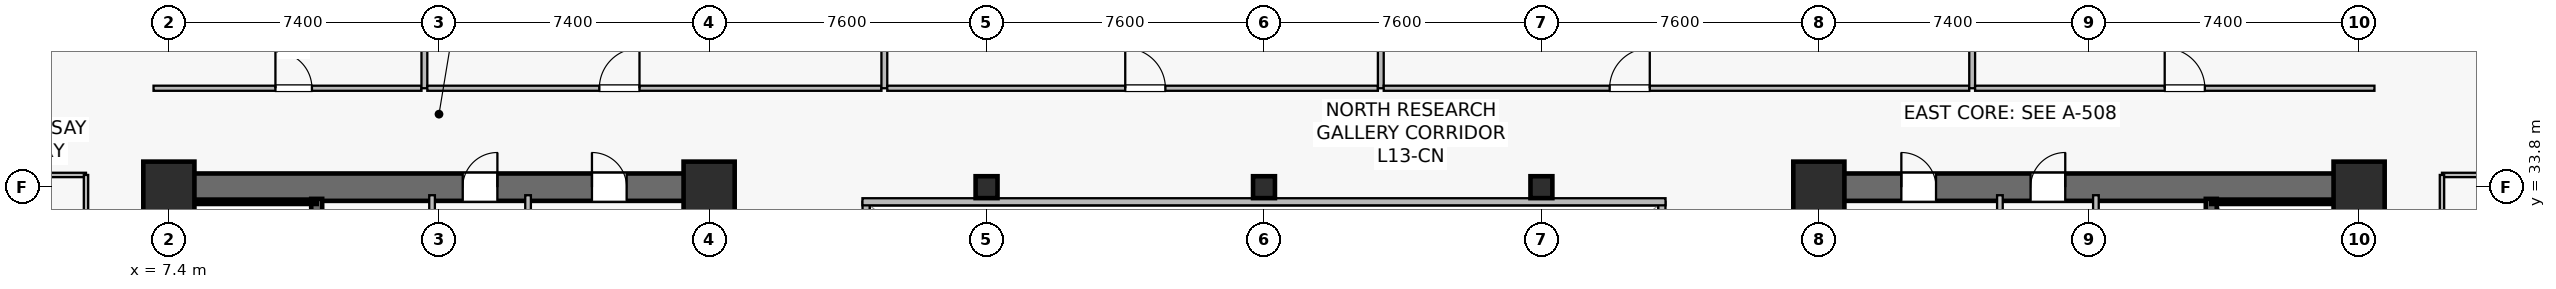
"""IFC4 building model, lengths in metres.
Left out: names, types, materials, properties, quantities, classifications, styles, units other than length and angle.
Written with IfcOpenShell. Run it as: python <this file> out.ifc"""

import sys

from ifc_helpers import new_model, si_unit, direction, frame, frame_2d, origin, origin_2d, place, context, subcontext, project, spatial, rectangle, hollow_rectangle, extrude, source, transform, mapped, element, fill, save


model = new_model("IFC4")
c1 = context("Model", 3, precision=1e-05, world=origin(), true_north=direction((0.0, 1.0)))
c2 = subcontext(c1, "Body", "Model", "MODEL_VIEW")
j1 = project(units=[si_unit("LENGTHUNIT", "METRE"), si_unit("PLANEANGLEUNIT", "RADIAN")], contexts=[c1])
p1 = place(None, origin())
s1 = spatial("IfcSite", under=j1, at=p1, CompositionType="ELEMENT")
p2 = place(p1, origin())
s2 = spatial("IfcBuilding", under=s1, at=p2, CompositionType="ELEMENT")
p3 = place(p2, frame((0.0, 0.0, 53.9)))
s3 = spatial("IfcBuildingStorey", under=s2, at=p3, CompositionType="ELEMENT", Elevation=53.9)
p4 = place(p3, frame((7.025, 33.8, 0.0), z_axis=(0.0, 0.0, 1.0), x_axis=(1.0, 0.0, 0.0)))
e1 = element("IfcWall", 1, at=p4, inside=s3, PredefinedType="SHEAR", context=c2, shape_type="SweptSolid", body=[
    extrude(rectangle(XDim=15.55, YDim=0.75, at=frame_2d((7.775, 0.0))), origin(), (0.0, 0.0, 1.0), 3.78),
])
p5 = place(p4, frame((8.425, 0.0, 0.0)))
e2 = element("IfcOpeningElement", 2, at=p5, cuts=e1, PredefinedType="OPENING", context=c2, shape_type="SweptSolid", body=[
    extrude(rectangle(XDim=0.95, YDim=2.15, at=frame_2d((0.475, 1.075))), frame((0.0, 0.385, 0.0), z_axis=(0.0, -1.0, 0.0), x_axis=(1.0, 0.0, 0.0)), (0.0, 0.0, 1.0), 0.77),
])
p6 = place(p4, frame((11.965, 0.0, 0.0)))
e3 = element("IfcOpeningElement", 3, at=p6, cuts=e1, PredefinedType="OPENING", context=c2, shape_type="SweptSolid", body=[
    extrude(rectangle(XDim=0.95, YDim=2.15, at=frame_2d((0.475, 1.075))), frame((0.0, 0.385, 0.0), z_axis=(0.0, -1.0, 0.0), x_axis=(1.0, 0.0, 0.0)), (0.0, 0.0, 1.0), 0.77),
])
p7 = place(p3, frame((7.4, 15.175, 0.0), z_axis=(0.0, 0.0, 1.0), x_axis=(0.0, 1.0, 0.0)))
e4 = element("IfcWall", 4, at=p7, inside=s3, PredefinedType="SHEAR", context=c2, shape_type="SweptSolid", body=[
    extrude(rectangle(XDim=18.25, YDim=0.75, at=frame_2d((9.125, 0.0))), origin(), (0.0, 0.0, 1.0), 3.78),
])
p8 = place(p3, frame((22.2, 15.175, 0.0), z_axis=(0.0, 0.0, 1.0), x_axis=(0.0, 1.0, 0.0)))
e5 = element("IfcWall", 5, at=p8, inside=s3, PredefinedType="SHEAR", context=c2, shape_type="SweptSolid", body=[
    extrude(rectangle(XDim=18.25, YDim=0.75, at=frame_2d((9.125, 0.0))), origin(), (0.0, 0.0, 1.0), 3.78),
])
p9 = place(p8, frame((3.375, 0.0, 0.0)))
e6 = element("IfcOpeningElement", 6, at=p9, cuts=e5, PredefinedType="OPENING", context=c2, shape_type="SweptSolid", body=[
    extrude(rectangle(XDim=1.42, YDim=2.2, at=frame_2d((0.71, 1.1))), frame((0.0, 0.385, 0.0), z_axis=(0.0, -1.0, 0.0), x_axis=(1.0, 0.0, 0.0)), (0.0, 0.0, 1.0), 0.77),
])
p10 = place(p3, frame((11.45, 24.85, 0.0), z_axis=(0.0, 0.0, 1.0), x_axis=(0.0, 1.0, 0.0)))
e7 = element("IfcWall", 7, at=p10, inside=s3, PredefinedType="SHEAR", context=c2, shape_type="SweptSolid", body=[
    extrude(rectangle(XDim=8.63, YDim=0.3, at=frame_2d((4.315, 0.0))), origin(), (0.0, 0.0, 1.0), 3.78),
])
p11 = place(p10, frame((0.42, 0.0, 0.0)))
e8 = element("IfcOpeningElement", 8, at=p11, cuts=e7, PredefinedType="OPENING", context=c2, shape_type="SweptSolid", body=[
    extrude(rectangle(XDim=1.1, YDim=2.15, at=frame_2d((0.55, 1.075))), frame((0.0, 0.16, 0.0), z_axis=(0.0, -1.0, 0.0), x_axis=(1.0, 0.0, 0.0)), (0.0, 0.0, 1.0), 0.32),
])
p12 = place(p3, frame((7.73, 33.4, 0.0), z_axis=(0.0, 0.0, 1.0), x_axis=(1.0, 0.0, 0.0)))
e9 = element("IfcWall", 9, at=p12, inside=s3, PredefinedType="SOLIDWALL", context=c2, shape_type="SweptSolid", body=[
    extrude(rectangle(XDim=3.72, YDim=0.12, at=frame_2d((1.86, 0.0))), origin(), (0.0, 0.0, 1.0), 3.78),
])
p13 = place(p3, frame((52.225, 33.8, 0.0), z_axis=(0.0, 0.0, 1.0), x_axis=(1.0, 0.0, 0.0)))
e10 = element("IfcWall", 10, at=p13, inside=s3, PredefinedType="SHEAR", context=c2, shape_type="SweptSolid", body=[
    extrude(rectangle(XDim=15.55, YDim=0.75, at=frame_2d((7.775, 0.0))), origin(), (0.0, 0.0, 1.0), 3.78),
])
p14 = place(p13, frame((6.175, 0.0, 0.0)))
e11 = element("IfcOpeningElement", 11, at=p14, cuts=e10, PredefinedType="OPENING", context=c2, shape_type="SweptSolid", body=[
    extrude(rectangle(XDim=0.95, YDim=2.15, at=frame_2d((0.475, 1.075))), frame((0.0, 0.385, 0.0), z_axis=(0.0, -1.0, 0.0), x_axis=(1.0, 0.0, 0.0)), (0.0, 0.0, 1.0), 0.77),
])
p15 = place(p13, frame((2.635, 0.0, 0.0)))
e12 = element("IfcOpeningElement", 12, at=p15, cuts=e10, PredefinedType="OPENING", context=c2, shape_type="SweptSolid", body=[
    extrude(rectangle(XDim=0.95, YDim=2.15, at=frame_2d((0.475, 1.075))), frame((0.0, 0.385, 0.0), z_axis=(0.0, -1.0, 0.0), x_axis=(1.0, 0.0, 0.0)), (0.0, 0.0, 1.0), 0.77),
])
p16 = place(p3, frame((52.6, 15.175, 0.0), z_axis=(0.0, 0.0, 1.0), x_axis=(0.0, 1.0, 0.0)))
e13 = element("IfcWall", 13, at=p16, inside=s3, PredefinedType="SHEAR", context=c2, shape_type="SweptSolid", body=[
    extrude(rectangle(XDim=18.25, YDim=0.75, at=frame_2d((9.125, 0.0))), origin(), (0.0, 0.0, 1.0), 3.78),
])
p17 = place(p16, frame((3.375, 0.0, 0.0)))
e14 = element("IfcOpeningElement", 14, at=p17, cuts=e13, PredefinedType="OPENING", context=c2, shape_type="SweptSolid", body=[
    extrude(rectangle(XDim=1.42, YDim=2.2, at=frame_2d((0.71, 1.1))), frame((0.0, 0.385, 0.0), z_axis=(0.0, -1.0, 0.0), x_axis=(1.0, 0.0, 0.0)), (0.0, 0.0, 1.0), 0.77),
])
p18 = place(p3, frame((67.4, 15.175, 0.0), z_axis=(0.0, 0.0, 1.0), x_axis=(0.0, 1.0, 0.0)))
e15 = element("IfcWall", 15, at=p18, inside=s3, PredefinedType="SHEAR", context=c2, shape_type="SweptSolid", body=[
    extrude(rectangle(XDim=18.25, YDim=0.75, at=frame_2d((9.125, 0.0))), origin(), (0.0, 0.0, 1.0), 3.78),
])
p19 = place(p3, frame((63.35, 24.85, 0.0), z_axis=(0.0, 0.0, 1.0), x_axis=(0.0, 1.0, 0.0)))
e16 = element("IfcWall", 16, at=p19, inside=s3, PredefinedType="SHEAR", context=c2, shape_type="SweptSolid", body=[
    extrude(rectangle(XDim=8.63, YDim=0.3, at=frame_2d((4.315, 0.0))), origin(), (0.0, 0.0, 1.0), 3.78),
])
p20 = place(p19, frame((0.42, 0.0, 0.0)))
e17 = element("IfcOpeningElement", 17, at=p20, cuts=e16, PredefinedType="OPENING", context=c2, shape_type="SweptSolid", body=[
    extrude(rectangle(XDim=1.1, YDim=2.15, at=frame_2d((0.55, 1.075))), frame((0.0, 0.16, 0.0), z_axis=(0.0, -1.0, 0.0), x_axis=(1.0, 0.0, 0.0)), (0.0, 0.0, 1.0), 0.32),
])
p21 = place(p3, frame((63.35, 33.4, 0.0), z_axis=(0.0, 0.0, 1.0), x_axis=(1.0, 0.0, 0.0)))
e18 = element("IfcWall", 18, at=p21, inside=s3, PredefinedType="SOLIDWALL", context=c2, shape_type="SweptSolid", body=[
    extrude(rectangle(XDim=3.72, YDim=0.12, at=frame_2d((1.86, 0.0))), origin(), (0.0, 0.0, 1.0), 3.78),
])
m1 = source(origin(), c2, "Body", "SweptSolid", [
    extrude(rectangle(XDim=1.4, YDim=1.4, at=origin_2d()), origin(), (0.0, 0.0, 1.0), 4.1),
])
for number, where, z_axis, x_axis in (
    (19, (7.4, 33.8, 0.0), (0.0, 0.0, 1.0), (1.0, 0.0, 0.0)),
    (20, (22.2, 33.8, 0.0), (0.0, 0.0, 1.0), (1.0, 0.0, 0.0)),
    (21, (52.6, 33.8, 0.0), (0.0, 0.0, 1.0), (1.0, 0.0, 0.0)),
    (22, (67.4, 33.8, 0.0), (0.0, 0.0, 1.0), (1.0, 0.0, 0.0)),
):
    element("IfcColumn", number, at=place(p3, frame(where, z_axis=z_axis, x_axis=x_axis)), inside=s3, PredefinedType="COLUMN", context=c2, shape_type="MappedRepresentation", body=[
        mapped(m1, transform((0.0, 0.0, 0.0), scale=1.0)),
    ])
m2 = source(origin(), c2, "Body", "SweptSolid", [
    extrude(hollow_rectangle(XDim=0.6, YDim=0.6, WallThickness=0.028, at=origin_2d()), origin(), (0.0, 0.0, 1.0), 4.1),
])
for number, where, z_axis, x_axis in (
    (23, (29.8, 33.8, 0.0), (0.0, 0.0, 1.0), (1.0, 0.0, 0.0)),
    (24, (37.4, 33.8, 0.0), (0.0, 0.0, 1.0), (1.0, 0.0, 0.0)),
    (25, (45.0, 33.8, 0.0), (0.0, 0.0, 1.0), (1.0, 0.0, 0.0)),
):
    element("IfcColumn", number, at=place(p3, frame(where, z_axis=z_axis, x_axis=x_axis)), inside=s3, PredefinedType="COLUMN", context=c2, shape_type="MappedRepresentation", body=[
        mapped(m2, transform((0.0, 0.0, 0.0), scale=1.0)),
    ])
p22 = place(p3, frame((14.61, 29.65, 0.0), z_axis=(0.0, 0.0, 1.0), x_axis=(0.0, 1.0, 0.0)))
e26 = element("IfcWall", 26, at=p22, inside=s3, PredefinedType="PLUMBINGWALL", context=c2, shape_type="SweptSolid", body=[
    extrude(rectangle(XDim=3.93, YDim=0.155, at=frame_2d((1.965, 0.0))), origin(), (0.0, 0.0, 1.0), 3.065),
])
p23 = place(p3, frame((17.24, 29.65, 0.0), z_axis=(0.0, 0.0, 1.0), x_axis=(0.0, 1.0, 0.0)))
e27 = element("IfcWall", 27, at=p23, inside=s3, PredefinedType="PLUMBINGWALL", context=c2, shape_type="SweptSolid", body=[
    extrude(rectangle(XDim=3.93, YDim=0.155, at=frame_2d((1.965, 0.0))), origin(), (0.0, 0.0, 1.0), 3.78),
])
p24 = place(p3, frame((60.19, 29.65, 0.0), z_axis=(0.0, 0.0, 1.0), x_axis=(0.0, 1.0, 0.0)))
e28 = element("IfcWall", 28, at=p24, inside=s3, PredefinedType="PLUMBINGWALL", context=c2, shape_type="SweptSolid", body=[
    extrude(rectangle(XDim=3.93, YDim=0.155, at=frame_2d((1.965, 0.0))), origin(), (0.0, 0.0, 1.0), 3.065),
])
p25 = place(p3, frame((57.56, 29.65, 0.0), z_axis=(0.0, 0.0, 1.0), x_axis=(0.0, 1.0, 0.0)))
e29 = element("IfcWall", 29, at=p25, inside=s3, PredefinedType="PLUMBINGWALL", context=c2, shape_type="SweptSolid", body=[
    extrude(rectangle(XDim=3.93, YDim=0.155, at=frame_2d((1.965, 0.0))), origin(), (0.0, 0.0, 1.0), 3.78),
])
p26 = place(p3, frame((26.5, 15.2, 0.0), z_axis=(0.0, 0.0, 1.0), x_axis=(0.0, 1.0, 0.0)))
e30 = element("IfcWall", 30, at=p26, inside=s3, PredefinedType="SOLIDWALL", context=c2, shape_type="SweptSolid", body=[
    extrude(rectangle(XDim=18.2, YDim=0.195, at=frame_2d((9.1, 0.0))), origin(), (0.0, 0.0, 1.0), 3.78),
])
p27 = place(p26, frame((1.8, 0.0, 0.9)))
e31 = element("IfcOpeningElement", 31, at=p27, cuts=e30, PredefinedType="OPENING", context=c2, shape_type="SweptSolid", body=[
    extrude(rectangle(XDim=1.2, YDim=1.35, at=frame_2d((0.6, 0.675))), frame((0.0, 0.107, 0.0), z_axis=(0.0, -1.0, 0.0), x_axis=(1.0, 0.0, 0.0)), (0.0, 0.0, 1.0), 0.215),
])
p28 = place(p26, frame((13.2, 0.0, 0.9)))
e32 = element("IfcOpeningElement", 32, at=p28, cuts=e30, PredefinedType="OPENING", context=c2, shape_type="SweptSolid", body=[
    extrude(rectangle(XDim=1.2, YDim=1.35, at=frame_2d((0.6, 0.675))), frame((0.0, 0.107, 0.0), z_axis=(0.0, -1.0, 0.0), x_axis=(1.0, 0.0, 0.0)), (0.0, 0.0, 1.0), 0.215),
])
p29 = place(p3, frame((48.3, 15.2, 0.0), z_axis=(0.0, 0.0, 1.0), x_axis=(0.0, 1.0, 0.0)))
e33 = element("IfcWall", 33, at=p29, inside=s3, PredefinedType="SOLIDWALL", context=c2, shape_type="SweptSolid", body=[
    extrude(rectangle(XDim=18.2, YDim=0.195, at=frame_2d((9.1, 0.0))), origin(), (0.0, 0.0, 1.0), 3.78),
])
p30 = place(p29, frame((1.8, 0.0, 0.9)))
e34 = element("IfcOpeningElement", 34, at=p30, cuts=e33, PredefinedType="OPENING", context=c2, shape_type="SweptSolid", body=[
    extrude(rectangle(XDim=1.2, YDim=1.35, at=frame_2d((0.6, 0.675))), frame((0.0, 0.107, 0.0), z_axis=(0.0, -1.0, 0.0), x_axis=(1.0, 0.0, 0.0)), (0.0, 0.0, 1.0), 0.215),
])
p31 = place(p29, frame((13.2, 0.0, 0.9)))
e35 = element("IfcOpeningElement", 35, at=p31, cuts=e33, PredefinedType="OPENING", context=c2, shape_type="SweptSolid", body=[
    extrude(rectangle(XDim=1.2, YDim=1.35, at=frame_2d((0.6, 0.675))), frame((0.0, 0.107, 0.0), z_axis=(0.0, -1.0, 0.0), x_axis=(1.0, 0.0, 0.0)), (0.0, 0.0, 1.0), 0.215),
])
p32 = place(p3, frame((26.4, 33.4, 0.0), z_axis=(0.0, 0.0, 1.0), x_axis=(1.0, 0.0, 0.0)))
e36 = element("IfcWall", 36, at=p32, inside=s3, PredefinedType="SOLIDWALL", context=c2, shape_type="SweptSolid", body=[
    extrude(rectangle(XDim=22.0, YDim=0.195, at=frame_2d((11.0, 0.0))), origin(), (0.0, 0.0, 1.0), 3.78),
])
p33 = place(p3, frame((6.98, 36.51, 0.0), z_axis=(0.0, 0.0, 1.0), x_axis=(1.0, 0.0, 0.0)))
e37 = element("IfcWall", 37, at=p33, inside=s3, PredefinedType="PARTITIONING", context=c2, shape_type="SweptSolid", body=[
    extrude(rectangle(XDim=7.34, YDim=0.14, at=frame_2d((3.67, 0.0))), origin(), (0.0, 0.0, 1.0), 3.265),
])
p34 = place(p33, frame((3.339, 0.0, 0.0)))
e38 = element("IfcOpeningElement", 38, at=p34, cuts=e37, PredefinedType="OPENING", context=c2, shape_type="SweptSolid", body=[
    extrude(rectangle(XDim=1.0, YDim=2.15, at=frame_2d((0.5, 1.075))), frame((0.0, 0.08, 0.0), z_axis=(0.0, -1.0, 0.0), x_axis=(1.0, 0.0, 0.0)), (0.0, 0.0, 1.0), 0.16),
])
p35 = place(p3, frame((14.4, 36.51, 0.0), z_axis=(0.0, 0.0, 1.0), x_axis=(0.0, 1.0, 0.0)))
e39 = element("IfcWall", 39, at=p35, inside=s3, PredefinedType="PARTITIONING", context=c2, shape_type="SweptSolid", body=[
    extrude(rectangle(XDim=11.98, YDim=0.16, at=frame_2d((5.99, 0.0))), origin(), (0.0, 0.0, 1.0), 3.015),
])
p36 = place(p3, frame((14.48, 36.51, 0.0), z_axis=(0.0, 0.0, 1.0), x_axis=(1.0, 0.0, 0.0)))
e40 = element("IfcWall", 40, at=p36, inside=s3, PredefinedType="PARTITIONING", context=c2, shape_type="SweptSolid", body=[
    extrude(rectangle(XDim=12.44, YDim=0.14, at=frame_2d((6.22, 0.0))), origin(), (0.0, 0.0, 1.0), 3.065),
])
p37 = place(p36, frame((4.712, 0.0, 0.0)))
e41 = element("IfcOpeningElement", 41, at=p37, cuts=e40, PredefinedType="OPENING", context=c2, shape_type="SweptSolid", body=[
    extrude(rectangle(XDim=1.1, YDim=2.18, at=frame_2d((0.55, 1.09))), frame((0.0, 0.08, 0.0), z_axis=(0.0, -1.0, 0.0), x_axis=(1.0, 0.0, 0.0)), (0.0, 0.0, 1.0), 0.16),
])
p38 = place(p3, frame((27.0, 36.51, 0.0), z_axis=(0.0, 0.0, 1.0), x_axis=(0.0, 1.0, 0.0)))
e42 = element("IfcWall", 42, at=p38, inside=s3, PredefinedType="PARTITIONING", context=c2, shape_type="SweptSolid", body=[
    extrude(rectangle(XDim=10.78, YDim=0.16, at=frame_2d((5.39, 0.0))), origin(), (0.0, 0.0, 1.0), 3.015),
])
p39 = place(p3, frame((27.08, 36.51, 0.0), z_axis=(0.0, 0.0, 1.0), x_axis=(1.0, 0.0, 0.0)))
e43 = element("IfcWall", 43, at=p39, inside=s3, PredefinedType="PARTITIONING", context=c2, shape_type="SweptSolid", body=[
    extrude(rectangle(XDim=13.44, YDim=0.14, at=frame_2d((6.72, 0.0))), origin(), (0.0, 0.0, 1.0), 3.065),
])
p40 = place(p39, frame((6.519, 0.0, 0.0)))
e44 = element("IfcOpeningElement", 44, at=p40, cuts=e43, PredefinedType="OPENING", context=c2, shape_type="SweptSolid", body=[
    extrude(rectangle(XDim=1.1, YDim=2.18, at=frame_2d((0.55, 1.09))), frame((0.0, 0.08, 0.0), z_axis=(0.0, -1.0, 0.0), x_axis=(1.0, 0.0, 0.0)), (0.0, 0.0, 1.0), 0.16),
])
p41 = place(p3, frame((40.6, 36.51, 0.0), z_axis=(0.0, 0.0, 1.0), x_axis=(0.0, 1.0, 0.0)))
e45 = element("IfcWall", 45, at=p41, inside=s3, PredefinedType="PARTITIONING", context=c2, shape_type="SweptSolid", body=[
    extrude(rectangle(XDim=10.78, YDim=0.16, at=frame_2d((5.39, 0.0))), origin(), (0.0, 0.0, 1.0), 3.015),
])
p42 = place(p3, frame((40.68, 36.51, 0.0), z_axis=(0.0, 0.0, 1.0), x_axis=(1.0, 0.0, 0.0)))
e46 = element("IfcWall", 46, at=p42, inside=s3, PredefinedType="PARTITIONING", context=c2, shape_type="SweptSolid", body=[
    extrude(rectangle(XDim=16.04, YDim=0.14, at=frame_2d((8.02, 0.0))), origin(), (0.0, 0.0, 1.0), 3.065),
])
p43 = place(p42, frame((6.188, 0.0, 0.0)))
e47 = element("IfcOpeningElement", 47, at=p43, cuts=e46, PredefinedType="OPENING", context=c2, shape_type="SweptSolid", body=[
    extrude(rectangle(XDim=1.1, YDim=2.18, at=frame_2d((0.55, 1.09))), frame((0.0, 0.08, 0.0), z_axis=(0.0, -1.0, 0.0), x_axis=(1.0, 0.0, 0.0)), (0.0, 0.0, 1.0), 0.16),
])
p44 = place(p3, frame((56.8, 36.51, 0.0), z_axis=(0.0, 0.0, 1.0), x_axis=(0.0, 1.0, 0.0)))
e48 = element("IfcWall", 48, at=p44, inside=s3, PredefinedType="PARTITIONING", context=c2, shape_type="SweptSolid", body=[
    extrude(rectangle(XDim=11.98, YDim=0.16, at=frame_2d((5.99, 0.0))), origin(), (0.0, 0.0, 1.0), 3.015),
])
p45 = place(p3, frame((56.88, 36.51, 0.0), z_axis=(0.0, 0.0, 1.0), x_axis=(1.0, 0.0, 0.0)))
e49 = element("IfcWall", 49, at=p45, inside=s3, PredefinedType="PARTITIONING", context=c2, shape_type="SweptSolid", body=[
    extrude(rectangle(XDim=10.94, YDim=0.14, at=frame_2d((5.47, 0.0))), origin(), (0.0, 0.0, 1.0), 3.065),
])
p46 = place(p45, frame((5.194, 0.0, 0.0)))
e50 = element("IfcOpeningElement", 50, at=p46, cuts=e49, PredefinedType="OPENING", context=c2, shape_type="SweptSolid", body=[
    extrude(rectangle(XDim=1.1, YDim=2.18, at=frame_2d((0.55, 1.09))), frame((0.0, 0.08, 0.0), z_axis=(0.0, -1.0, 0.0), x_axis=(1.0, 0.0, 0.0)), (0.0, 0.0, 1.0), 0.16),
])
p47 = place(p3, frame((0.11, 34.135, 0.0), z_axis=(0.0, 0.0, 1.0), x_axis=(1.0, 0.0, 0.0)))
e51 = element("IfcWall", 51, at=p47, inside=s3, PredefinedType="PARTITIONING", context=c2, shape_type="SweptSolid", body=[
    extrude(rectangle(XDim=5.02, YDim=0.12, at=frame_2d((2.51, 0.0))), origin(), (0.0, 0.0, 1.0), 3.78),
])
p48 = place(p3, frame((5.13, 29.66, 0.0), z_axis=(0.0, 0.0, 1.0), x_axis=(0.0, 1.0, 0.0)))
e52 = element("IfcWall", 52, at=p48, inside=s3, PredefinedType="PARTITIONING", context=c2, shape_type="SweptSolid", body=[
    extrude(rectangle(XDim=4.475, YDim=0.12, at=frame_2d((2.238, 0.0))), origin(), (0.0, 0.0, 1.0), 3.78),
])
p49 = place(p48, frame((1.788, 0.0, 0.0)))
e53 = element("IfcOpeningElement", 53, at=p49, cuts=e52, PredefinedType="OPENING", context=c2, shape_type="SweptSolid", body=[
    extrude(rectangle(XDim=0.9, YDim=2.1, at=frame_2d((0.45, 1.05))), frame((0.0, 0.07, 0.0), z_axis=(0.0, -1.0, 0.0), x_axis=(1.0, 0.0, 0.0)), (0.0, 0.0, 1.0), 0.14),
])
p50 = place(p3, frame((69.67, 34.135, 0.0), z_axis=(0.0, 0.0, 1.0), x_axis=(1.0, 0.0, 0.0)))
e54 = element("IfcWall", 54, at=p50, inside=s3, PredefinedType="PARTITIONING", context=c2, shape_type="SweptSolid", body=[
    extrude(rectangle(XDim=5.02, YDim=0.12, at=frame_2d((2.51, 0.0))), origin(), (0.0, 0.0, 1.0), 3.78),
])
p51 = place(p3, frame((69.67, 26.46, 0.0), z_axis=(0.0, 0.0, 1.0), x_axis=(0.0, 1.0, 0.0)))
e55 = element("IfcWall", 55, at=p51, inside=s3, PredefinedType="PARTITIONING", context=c2, shape_type="SweptSolid", body=[
    extrude(rectangle(XDim=7.675, YDim=0.12, at=frame_2d((3.837, 0.0))), origin(), (0.0, 0.0, 1.0), 3.78),
])
p52 = place(p51, frame((3.387, 0.0, 0.0)))
e56 = element("IfcOpeningElement", 56, at=p52, cuts=e55, PredefinedType="OPENING", context=c2, shape_type="SweptSolid", body=[
    extrude(rectangle(XDim=0.9, YDim=2.1, at=frame_2d((0.45, 1.05))), frame((0.0, 0.07, 0.0), z_axis=(0.0, -1.0, 0.0), x_axis=(1.0, 0.0, 0.0)), (0.0, 0.0, 1.0), 0.14),
])
m3 = source(origin(), c2, "Body", "SweptSolid", [
    extrude(rectangle(XDim=0.95, YDim=2.15, at=frame_2d((0.475, 1.075))), frame((0.0, 0.025, 0.0), z_axis=(0.0, -1.0, 0.0), x_axis=(1.0, 0.0, 0.0)), (0.0, 0.0, 1.0), 0.05),
])
p53 = place(p5, origin())
e57 = element("IfcDoor", 57, at=p53, inside=s3, OperationType="SINGLE_SWING_RIGHT", PredefinedType="DOOR", context=c2, shape_type="MappedRepresentation", body=[
    mapped(m3, transform((0.0, 0.0, 0.0), scale=1.0)),
])
fill(e2, e57)
p54 = place(p6, origin())
e58 = element("IfcDoor", 58, at=p54, inside=s3, OperationType="SINGLE_SWING_LEFT", PredefinedType="DOOR", context=c2, shape_type="MappedRepresentation", body=[
    mapped(m3, transform((0.0, 0.0, 0.0), scale=1.0)),
])
fill(e3, e58)
p55 = place(p14, origin())
e59 = element("IfcDoor", 59, at=p55, inside=s3, OperationType="SINGLE_SWING_RIGHT", PredefinedType="DOOR", context=c2, shape_type="MappedRepresentation", body=[
    mapped(m3, transform((0.0, 0.0, 0.0), scale=1.0)),
])
fill(e11, e59)
p56 = place(p15, origin())
e60 = element("IfcDoor", 60, at=p56, inside=s3, OperationType="SINGLE_SWING_LEFT", PredefinedType="DOOR", context=c2, shape_type="MappedRepresentation", body=[
    mapped(m3, transform((0.0, 0.0, 0.0), scale=1.0)),
])
fill(e12, e60)
m4 = source(origin(), c2, "Body", "SweptSolid", [
    extrude(rectangle(XDim=1.0, YDim=2.15, at=frame_2d((0.5, 1.075))), frame((0.0, 0.025, 0.0), z_axis=(0.0, -1.0, 0.0), x_axis=(1.0, 0.0, 0.0)), (0.0, 0.0, 1.0), 0.05),
])
p57 = place(p34, origin())
e61 = element("IfcDoor", 61, at=p57, inside=s3, OperationType="SINGLE_SWING_LEFT", PredefinedType="DOOR", context=c2, shape_type="MappedRepresentation", body=[
    mapped(m4, transform((0.0, 0.0, 0.0), scale=1.0)),
])
fill(e38, e61)
m5 = source(origin(), c2, "Body", "SweptSolid", [
    extrude(rectangle(XDim=1.1, YDim=2.18, at=frame_2d((0.55, 1.09))), frame((0.0, 0.025, 0.0), z_axis=(0.0, -1.0, 0.0), x_axis=(1.0, 0.0, 0.0)), (0.0, 0.0, 1.0), 0.05),
])
p58 = place(p37, origin())
e62 = element("IfcDoor", 62, at=p58, inside=s3, OperationType="SINGLE_SWING_RIGHT", PredefinedType="DOOR", context=c2, shape_type="MappedRepresentation", body=[
    mapped(m5, transform((0.0, 0.0, 0.0), scale=1.0)),
])
fill(e41, e62)
p59 = place(p40, origin())
e63 = element("IfcDoor", 63, at=p59, inside=s3, OperationType="SINGLE_SWING_LEFT", PredefinedType="DOOR", context=c2, shape_type="MappedRepresentation", body=[
    mapped(m5, transform((0.0, 0.0, 0.0), scale=1.0)),
])
fill(e44, e63)
p60 = place(p43, origin())
e64 = element("IfcDoor", 64, at=p60, inside=s3, OperationType="SINGLE_SWING_RIGHT", PredefinedType="DOOR", context=c2, shape_type="MappedRepresentation", body=[
    mapped(m5, transform((0.0, 0.0, 0.0), scale=1.0)),
])
fill(e47, e64)
p61 = place(p46, origin())
e65 = element("IfcDoor", 65, at=p61, inside=s3, OperationType="SINGLE_SWING_LEFT", PredefinedType="DOOR", context=c2, shape_type="MappedRepresentation", body=[
    mapped(m5, transform((0.0, 0.0, 0.0), scale=1.0)),
])
fill(e50, e65)
save(model, sys.argv[1])
